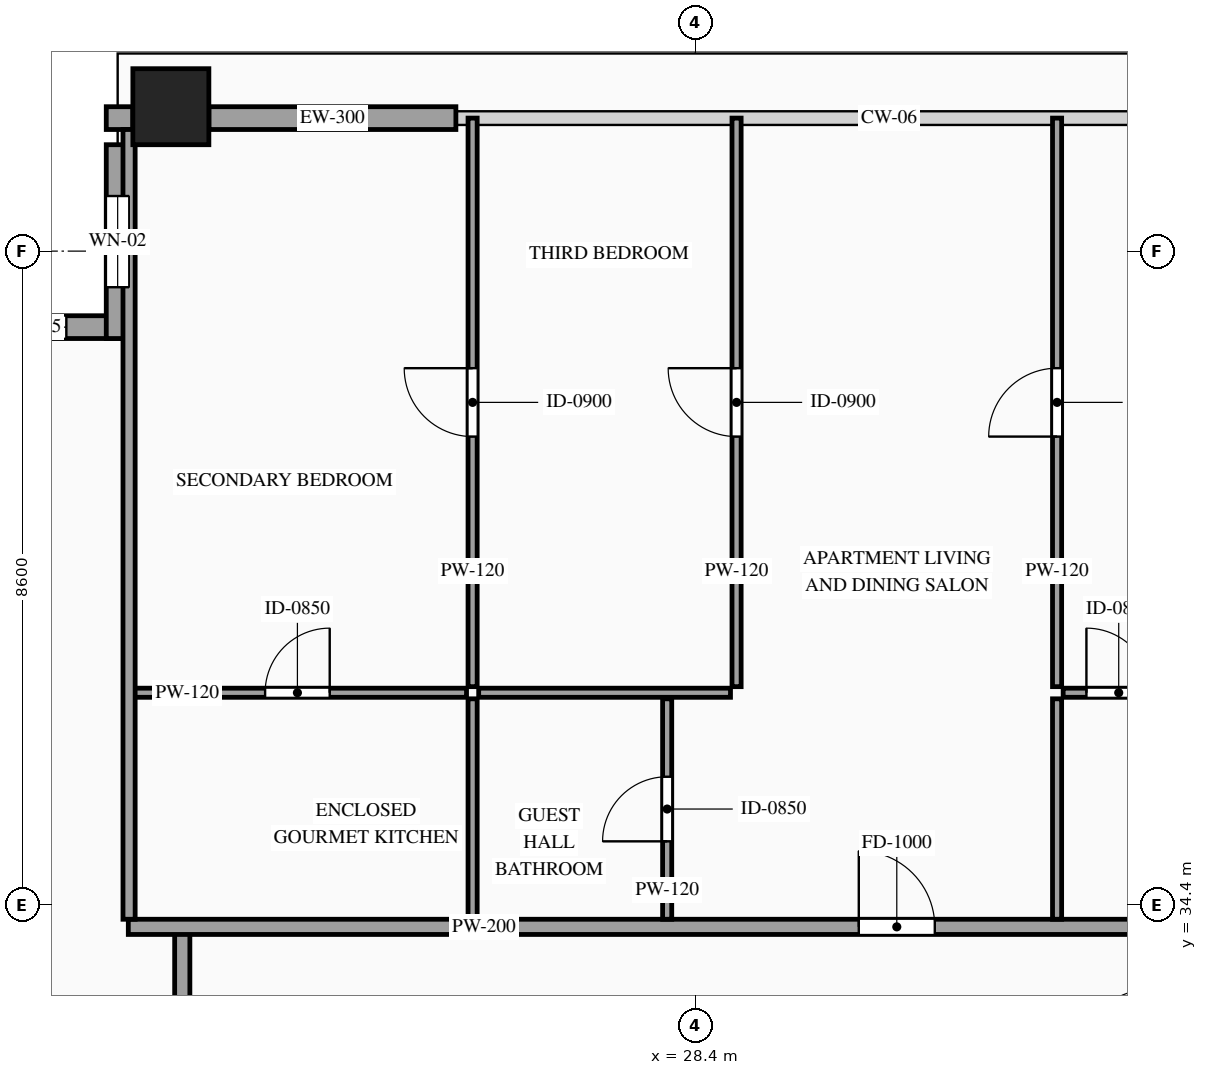
"""IFC4 building model, lengths in metres.
Left out: names, types, materials, properties, quantities, classifications, styles, units other than length and angle.
Written with IfcOpenShell. Run it as: python <this file> out.ifc"""

import sys

from ifc_helpers import new_model, si_unit, direction, frame, frame_2d, origin, origin_2d, place, context, subcontext, project, spatial, rectangle, hollow_rectangle, extrude, source, transform, mapped, element, fill, save


model = new_model("IFC4")
c1 = context("Model", 3, precision=1e-05, world=origin(), true_north=direction((0.0, 1.0)))
c2 = subcontext(c1, "Body", "Model", "MODEL_VIEW")
j1 = project(units=[si_unit("LENGTHUNIT", "METRE"), si_unit("PLANEANGLEUNIT", "RADIAN")], contexts=[c1])
p1 = place(None, origin())
s1 = spatial("IfcSite", under=j1, at=p1, CompositionType="ELEMENT")
p2 = place(p1, origin())
s2 = spatial("IfcBuilding", under=s1, at=p2, CompositionType="ELEMENT")
p3 = place(p2, frame((0.0, 0.0, 292.6)))
s3 = spatial("IfcBuildingStorey", under=s2, at=p3, CompositionType="ELEMENT", Elevation=292.6)
m1 = source(origin(), c2, "Body", "SweptSolid", [
    extrude(hollow_rectangle(XDim=1.0, YDim=1.0, WallThickness=0.048, at=origin_2d()), origin(), (0.0, 0.0, 1.0), 3.5),
])
p4 = place(p3, frame((21.5, 44.9, 0.0), z_axis=(0.0, 0.0, 1.0), x_axis=(1.0, 0.0, 0.0)))
e1 = element("IfcColumn", 1, at=p4, inside=s3, PredefinedType="COLUMN", context=c2, shape_type="MappedRepresentation", body=[
    mapped(m1, transform((0.0, 0.0, 0.0), scale=1.0)),
])
p5 = place(p3, frame((20.95, 42.0, 0.0), z_axis=(0.0, 0.0, 1.0), x_axis=(-1.0, 0.0, 0.0)))
e2 = element("IfcWall", 2, at=p5, inside=s3, PredefinedType="SOLIDWALL", context=c2, shape_type="SweptSolid", body=[
    extrude(rectangle(XDim=2.55, YDim=0.3, at=frame_2d((1.275, 0.0))), origin(), (0.0, 0.0, 1.0), 3.28),
])
p6 = place(p5, frame((0.825, 0.0, 0.85)))
e3 = element("IfcOpeningElement", 3, at=p6, cuts=e2, PredefinedType="OPENING", context=c2, shape_type="SweptSolid", body=[
    extrude(rectangle(XDim=0.9, YDim=1.5, at=frame_2d((0.45, 0.75))), frame((0.0, 0.165, 0.0), z_axis=(0.0, -1.0, 0.0), x_axis=(1.0, 0.0, 0.0)), (0.0, 0.0, 1.0), 0.33),
])
p7 = place(p3, frame((20.8, 44.4, 0.0), z_axis=(0.0, 0.0, 1.0), x_axis=(0.0, -1.0, 0.0)))
e4 = element("IfcWall", 4, at=p7, inside=s3, PredefinedType="SOLIDWALL", context=c2, shape_type="SweptSolid", body=[
    extrude(rectangle(XDim=2.55, YDim=0.3, at=frame_2d((1.275, 0.0))), origin(), (0.0, 0.0, 1.0), 3.28),
])
p8 = place(p7, frame((0.675, 0.0, 0.85)))
e5 = element("IfcOpeningElement", 5, at=p8, cuts=e4, PredefinedType="OPENING", context=c2, shape_type="SweptSolid", body=[
    extrude(rectangle(XDim=1.2, YDim=2.1, at=frame_2d((0.6, 1.05))), frame((0.0, 0.165, 0.0), z_axis=(0.0, -1.0, 0.0), x_axis=(1.0, 0.0, 0.0)), (0.0, 0.0, 1.0), 0.33),
])
m2 = source(origin(), c2, "Body", "SweptSolid", [
    extrude(rectangle(XDim=0.35, YDim=0.3, at=frame_2d((0.175, 0.0))), origin(), (0.0, 0.0, 1.0), 3.28),
])
p9 = place(p3, frame((20.65, 44.75, 0.0), z_axis=(0.0, 0.0, 1.0), x_axis=(1.0, 0.0, 0.0)))
e6 = element("IfcWall", 6, at=p9, inside=s3, PredefinedType="SOLIDWALL", context=c2, shape_type="MappedRepresentation", body=[
    mapped(m2, transform((0.0, 0.0, 0.0), scale=1.0)),
])
m3 = source(origin(), c2, "Body", "SweptSolid", [
    extrude(rectangle(XDim=3.25, YDim=0.3, at=frame_2d((1.625, 0.0))), origin(), (0.0, 0.0, 1.0), 2.885),
])
p10 = place(p3, frame((22.0, 44.75, 0.0), z_axis=(0.0, 0.0, 1.0), x_axis=(1.0, 0.0, 0.0)))
e7 = element("IfcWall", 7, at=p10, inside=s3, PredefinedType="SOLIDWALL", context=c2, shape_type="MappedRepresentation", body=[
    mapped(m3, transform((0.0, 0.0, 0.0), scale=1.0)),
])
m4 = source(origin(), c2, "Body", "SweptSolid", [
    extrude(rectangle(XDim=1.7, YDim=0.2, at=frame_2d((0.85, 0.0))), origin(), (0.0, 0.0, 1.0), 3.28),
])
p11 = place(p3, frame((21.65, 32.35, 0.0), z_axis=(0.0, 0.0, 1.0), x_axis=(0.0, 1.0, 0.0)))
e8 = element("IfcWall", 8, at=p11, inside=s3, PredefinedType="PARTITIONING", context=c2, shape_type="MappedRepresentation", body=[
    mapped(m4, transform((0.0, 0.0, 0.0), scale=1.0)),
])
p12 = place(p3, frame((20.94, 34.11, 0.0), z_axis=(0.0, 0.0, 1.0), x_axis=(1.0, 0.0, 0.0)))
e9 = element("IfcWall", 9, at=p12, inside=s3, PredefinedType="PARTITIONING", context=c2, shape_type="SweptSolid", body=[
    extrude(rectangle(XDim=16.622, YDim=0.2, at=frame_2d((8.311, 0.0))), origin(), (0.0, 0.0, 1.0), 3.28),
])
p13 = place(p12, frame((9.611, 0.0, 0.0)))
e10 = element("IfcOpeningElement", 10, at=p13, cuts=e9, PredefinedType="OPENING", context=c2, shape_type="SweptSolid", body=[
    extrude(rectangle(XDim=1.0, YDim=2.2, at=frame_2d((0.5, 1.1))), frame((0.0, 0.115, 0.0), z_axis=(0.0, -1.0, 0.0), x_axis=(1.0, 0.0, 0.0)), (0.0, 0.0, 1.0), 0.23),
])
p14 = place(p3, frame((20.94, 37.19, 0.0), z_axis=(0.0, 0.0, 1.0), x_axis=(1.0, 0.0, 0.0)))
e11 = element("IfcWall", 11, at=p14, inside=s3, PredefinedType="PARTITIONING", context=c2, shape_type="SweptSolid", body=[
    extrude(rectangle(XDim=4.45, YDim=0.12, at=frame_2d((2.225, 0.0))), origin(), (0.0, 0.0, 1.0), 3.28),
])
p15 = place(p14, frame((1.8, 0.0, 0.0)))
e12 = element("IfcOpeningElement", 12, at=p15, cuts=e11, PredefinedType="OPENING", context=c2, shape_type="SweptSolid", body=[
    extrude(rectangle(XDim=0.85, YDim=2.1, at=frame_2d((0.425, 1.05))), frame((0.0, 0.075, 0.0), z_axis=(0.0, -1.0, 0.0), x_axis=(1.0, 0.0, 0.0)), (0.0, 0.0, 1.0), 0.15),
])
m5 = source(origin(), c2, "Body", "SweptSolid", [
    extrude(rectangle(XDim=2.9, YDim=0.12, at=frame_2d((1.45, 0.0))), origin(), (0.0, 0.0, 1.0), 3.28),
])
p16 = place(p3, frame((25.47, 34.21, 0.0), z_axis=(0.0, 0.0, 1.0), x_axis=(0.0, 1.0, 0.0)))
e13 = element("IfcWall", 13, at=p16, inside=s3, PredefinedType="PARTITIONING", context=c2, shape_type="MappedRepresentation", body=[
    mapped(m5, transform((0.0, 0.0, 0.0), scale=1.0)),
])
p17 = place(p3, frame((28.03, 34.21, 0.0), z_axis=(0.0, 0.0, 1.0), x_axis=(0.0, 1.0, 0.0)))
e14 = element("IfcWall", 14, at=p17, inside=s3, PredefinedType="PARTITIONING", context=c2, shape_type="SweptSolid", body=[
    extrude(rectangle(XDim=2.9, YDim=0.12, at=frame_2d((1.45, 0.0))), origin(), (0.0, 0.0, 1.0), 3.28),
])
p18 = place(p17, frame((1.025, 0.0, 0.0)))
e15 = element("IfcOpeningElement", 15, at=p18, cuts=e14, PredefinedType="OPENING", context=c2, shape_type="SweptSolid", body=[
    extrude(rectangle(XDim=0.85, YDim=2.1, at=frame_2d((0.425, 1.05))), frame((0.0, 0.075, 0.0), z_axis=(0.0, -1.0, 0.0), x_axis=(1.0, 0.0, 0.0)), (0.0, 0.0, 1.0), 0.15),
])
p19 = place(p3, frame((33.16, 34.21, 0.0), z_axis=(0.0, 0.0, 1.0), x_axis=(0.0, 1.0, 0.0)))
e16 = element("IfcWall", 16, at=p19, inside=s3, PredefinedType="PARTITIONING", context=c2, shape_type="MappedRepresentation", body=[
    mapped(m5, transform((0.0, 0.0, 0.0), scale=1.0)),
])
p20 = place(p3, frame((25.47, 37.27, 0.0), z_axis=(0.0, 0.0, 1.0), x_axis=(0.0, 1.0, 0.0)))
e17 = element("IfcWall", 17, at=p20, inside=s3, PredefinedType="PARTITIONING", context=c2, shape_type="SweptSolid", body=[
    extrude(rectangle(XDim=7.48, YDim=0.12, at=frame_2d((3.74, 0.0))), origin(), (0.0, 0.0, 1.0), 3.28),
])
p21 = place(p20, frame((3.29, 0.0, 0.0)))
e18 = element("IfcOpeningElement", 18, at=p21, cuts=e17, PredefinedType="OPENING", context=c2, shape_type="SweptSolid", body=[
    extrude(rectangle(XDim=0.9, YDim=2.15, at=frame_2d((0.45, 1.075))), frame((0.0, 0.075, 0.0), z_axis=(0.0, -1.0, 0.0), x_axis=(1.0, 0.0, 0.0)), (0.0, 0.0, 1.0), 0.15),
])
p22 = place(p3, frame((33.24, 37.19, 0.0), z_axis=(0.0, 0.0, 1.0), x_axis=(1.0, 0.0, 0.0)))
e19 = element("IfcWall", 19, at=p22, inside=s3, PredefinedType="PARTITIONING", context=c2, shape_type="SweptSolid", body=[
    extrude(rectangle(XDim=4.322, YDim=0.12, at=frame_2d((2.161, 0.0))), origin(), (0.0, 0.0, 1.0), 3.28),
])
p23 = place(p22, frame((2.547, 0.0, 0.0)))
e20 = element("IfcOpeningElement", 20, at=p23, cuts=e19, PredefinedType="OPENING", context=c2, shape_type="SweptSolid", body=[
    extrude(rectangle(XDim=0.85, YDim=2.1, at=frame_2d((0.425, 1.05))), frame((0.0, 0.075, 0.0), z_axis=(0.0, -1.0, 0.0), x_axis=(1.0, 0.0, 0.0)), (0.0, 0.0, 1.0), 0.15),
])
p24 = place(p22, frame((0.306, 0.0, 0.0)))
e21 = element("IfcOpeningElement", 21, at=p24, cuts=e19, PredefinedType="OPENING", context=c2, shape_type="SweptSolid", body=[
    extrude(rectangle(XDim=0.85, YDim=2.1, at=frame_2d((0.425, 1.05))), frame((0.0, 0.075, 0.0), z_axis=(0.0, -1.0, 0.0), x_axis=(1.0, 0.0, 0.0)), (0.0, 0.0, 1.0), 0.15),
])
p25 = place(p3, frame((33.16, 37.27, 0.0), z_axis=(0.0, 0.0, 1.0), x_axis=(0.0, 1.0, 0.0)))
e22 = element("IfcWall", 22, at=p25, inside=s3, PredefinedType="PARTITIONING", context=c2, shape_type="SweptSolid", body=[
    extrude(rectangle(XDim=7.48, YDim=0.12, at=frame_2d((3.74, 0.0))), origin(), (0.0, 0.0, 1.0), 3.28),
])
p26 = place(p25, frame((3.29, 0.0, 0.0)))
e23 = element("IfcOpeningElement", 23, at=p26, cuts=e22, PredefinedType="OPENING", context=c2, shape_type="SweptSolid", body=[
    extrude(rectangle(XDim=0.9, YDim=2.15, at=frame_2d((0.45, 1.075))), frame((0.0, 0.075, 0.0), z_axis=(0.0, -1.0, 0.0), x_axis=(1.0, 0.0, 0.0)), (0.0, 0.0, 1.0), 0.15),
])
m6 = source(origin(), c2, "Body", "SweptSolid", [
    extrude(rectangle(XDim=3.313, YDim=0.12, at=frame_2d((1.656, 0.0))), origin(), (0.0, 0.0, 1.0), 3.28),
])
p27 = place(p3, frame((25.55, 37.19, 0.0), z_axis=(0.0, 0.0, 1.0), x_axis=(1.0, 0.0, 0.0)))
e24 = element("IfcWall", 24, at=p27, inside=s3, PredefinedType="PARTITIONING", context=c2, shape_type="MappedRepresentation", body=[
    mapped(m6, transform((0.0, 0.0, 0.0), scale=1.0)),
])
p28 = place(p3, frame((28.943, 37.27, 0.0), z_axis=(0.0, 0.0, 1.0), x_axis=(0.0, 1.0, 0.0)))
e25 = element("IfcWall", 25, at=p28, inside=s3, PredefinedType="PARTITIONING", context=c2, shape_type="SweptSolid", body=[
    extrude(rectangle(XDim=7.48, YDim=0.12, at=frame_2d((3.74, 0.0))), origin(), (0.0, 0.0, 1.0), 3.28),
])
p29 = place(p28, frame((3.29, 0.0, 0.0)))
e26 = element("IfcOpeningElement", 26, at=p29, cuts=e25, PredefinedType="OPENING", context=c2, shape_type="SweptSolid", body=[
    extrude(rectangle(XDim=0.9, YDim=2.15, at=frame_2d((0.45, 1.075))), frame((0.0, 0.075, 0.0), z_axis=(0.0, -1.0, 0.0), x_axis=(1.0, 0.0, 0.0)), (0.0, 0.0, 1.0), 0.15),
])
m7 = source(origin(), c2, "Body", "SweptSolid", [
    extrude(rectangle(XDim=10.39, YDim=0.16, at=frame_2d((5.195, 0.0))), origin(), (0.0, 0.0, 1.0), 3.28),
])
p30 = place(p3, frame((20.95, 34.21, 0.0), z_axis=(0.0, 0.0, 1.0), x_axis=(0.0, 1.0, 0.0)))
e27 = element("IfcWall", 27, at=p30, inside=s3, PredefinedType="PARTITIONING", context=c2, shape_type="MappedRepresentation", body=[
    mapped(m7, transform((0.0, 0.0, 0.0), scale=1.0)),
])
m8 = source(origin(), c2, "Body", "SweptSolid", [
    extrude(rectangle(XDim=0.9, YDim=1.5, at=frame_2d((0.45, 0.75))), frame((0.0, 0.03, 0.0), z_axis=(0.0, -1.0, 0.0), x_axis=(1.0, 0.0, 0.0)), (0.0, 0.0, 1.0), 0.06),
])
p31 = place(p6, origin())
e28 = element("IfcWindow", 28, at=p31, inside=s3, PartitioningType="SINGLE_PANEL", PredefinedType="WINDOW", context=c2, shape_type="MappedRepresentation", body=[
    mapped(m8, transform((0.0, 0.0, 0.0), scale=1.0)),
])
fill(e3, e28)
m9 = source(origin(), c2, "Body", "SweptSolid", [
    extrude(rectangle(XDim=1.2, YDim=2.1, at=frame_2d((0.6, 1.05))), frame((0.0, 0.03, 0.0), z_axis=(0.0, -1.0, 0.0), x_axis=(1.0, 0.0, 0.0)), (0.0, 0.0, 1.0), 0.06),
])
p32 = place(p8, origin())
e29 = element("IfcWindow", 29, at=p32, inside=s3, PartitioningType="SINGLE_PANEL", PredefinedType="WINDOW", context=c2, shape_type="MappedRepresentation", body=[
    mapped(m9, transform((0.0, 0.0, 0.0), scale=1.0)),
])
fill(e5, e29)
m10 = source(origin(), c2, "Body", "SweptSolid", [
    extrude(rectangle(XDim=1.0, YDim=2.2, at=frame_2d((0.5, 1.1))), frame((0.0, 0.025, 0.0), z_axis=(0.0, -1.0, 0.0), x_axis=(1.0, 0.0, 0.0)), (0.0, 0.0, 1.0), 0.05),
])
p33 = place(p13, origin())
e30 = element("IfcDoor", 30, at=p33, inside=s3, OperationType="SINGLE_SWING_LEFT", PredefinedType="DOOR", context=c2, shape_type="MappedRepresentation", body=[
    mapped(m10, transform((0.0, 0.0, 0.0), scale=1.0)),
])
fill(e10, e30)
m11 = source(origin(), c2, "Body", "SweptSolid", [
    extrude(rectangle(XDim=0.85, YDim=2.1, at=frame_2d((0.425, 1.05))), frame((0.0, 0.025, 0.0), z_axis=(0.0, -1.0, 0.0), x_axis=(1.0, 0.0, 0.0)), (0.0, 0.0, 1.0), 0.05),
])
p34 = place(p15, origin())
e31 = element("IfcDoor", 31, at=p34, inside=s3, OperationType="SINGLE_SWING_RIGHT", PredefinedType="DOOR", context=c2, shape_type="MappedRepresentation", body=[
    mapped(m11, transform((0.0, 0.0, 0.0), scale=1.0)),
])
fill(e12, e31)
p35 = place(p18, origin())
e32 = element("IfcDoor", 32, at=p35, inside=s3, OperationType="SINGLE_SWING_LEFT", PredefinedType="DOOR", context=c2, shape_type="MappedRepresentation", body=[
    mapped(m11, transform((0.0, 0.0, 0.0), scale=1.0)),
])
fill(e15, e32)
p36 = place(p24, origin())
e33 = element("IfcDoor", 33, at=p36, inside=s3, OperationType="SINGLE_SWING_LEFT", PredefinedType="DOOR", context=c2, shape_type="MappedRepresentation", body=[
    mapped(m11, transform((0.0, 0.0, 0.0), scale=1.0)),
])
fill(e21, e33)
m12 = source(origin(), c2, "Body", "SweptSolid", [
    extrude(rectangle(XDim=0.9, YDim=2.15, at=frame_2d((0.45, 1.075))), frame((0.0, 0.025, 0.0), z_axis=(0.0, -1.0, 0.0), x_axis=(1.0, 0.0, 0.0)), (0.0, 0.0, 1.0), 0.05),
])
p37 = place(p21, origin())
e34 = element("IfcDoor", 34, at=p37, inside=s3, OperationType="SINGLE_SWING_RIGHT", PredefinedType="DOOR", context=c2, shape_type="MappedRepresentation", body=[
    mapped(m12, transform((0.0, 0.0, 0.0), scale=1.0)),
])
fill(e18, e34)
p38 = place(p26, origin())
e35 = element("IfcDoor", 35, at=p38, inside=s3, OperationType="SINGLE_SWING_LEFT", PredefinedType="DOOR", context=c2, shape_type="MappedRepresentation", body=[
    mapped(m12, transform((0.0, 0.0, 0.0), scale=1.0)),
])
fill(e23, e35)
p39 = place(p29, origin())
e36 = element("IfcDoor", 36, at=p39, inside=s3, OperationType="SINGLE_SWING_RIGHT", PredefinedType="DOOR", context=c2, shape_type="MappedRepresentation", body=[
    mapped(m12, transform((0.0, 0.0, 0.0), scale=1.0)),
])
fill(e26, e36)
save(model, sys.argv[1])
